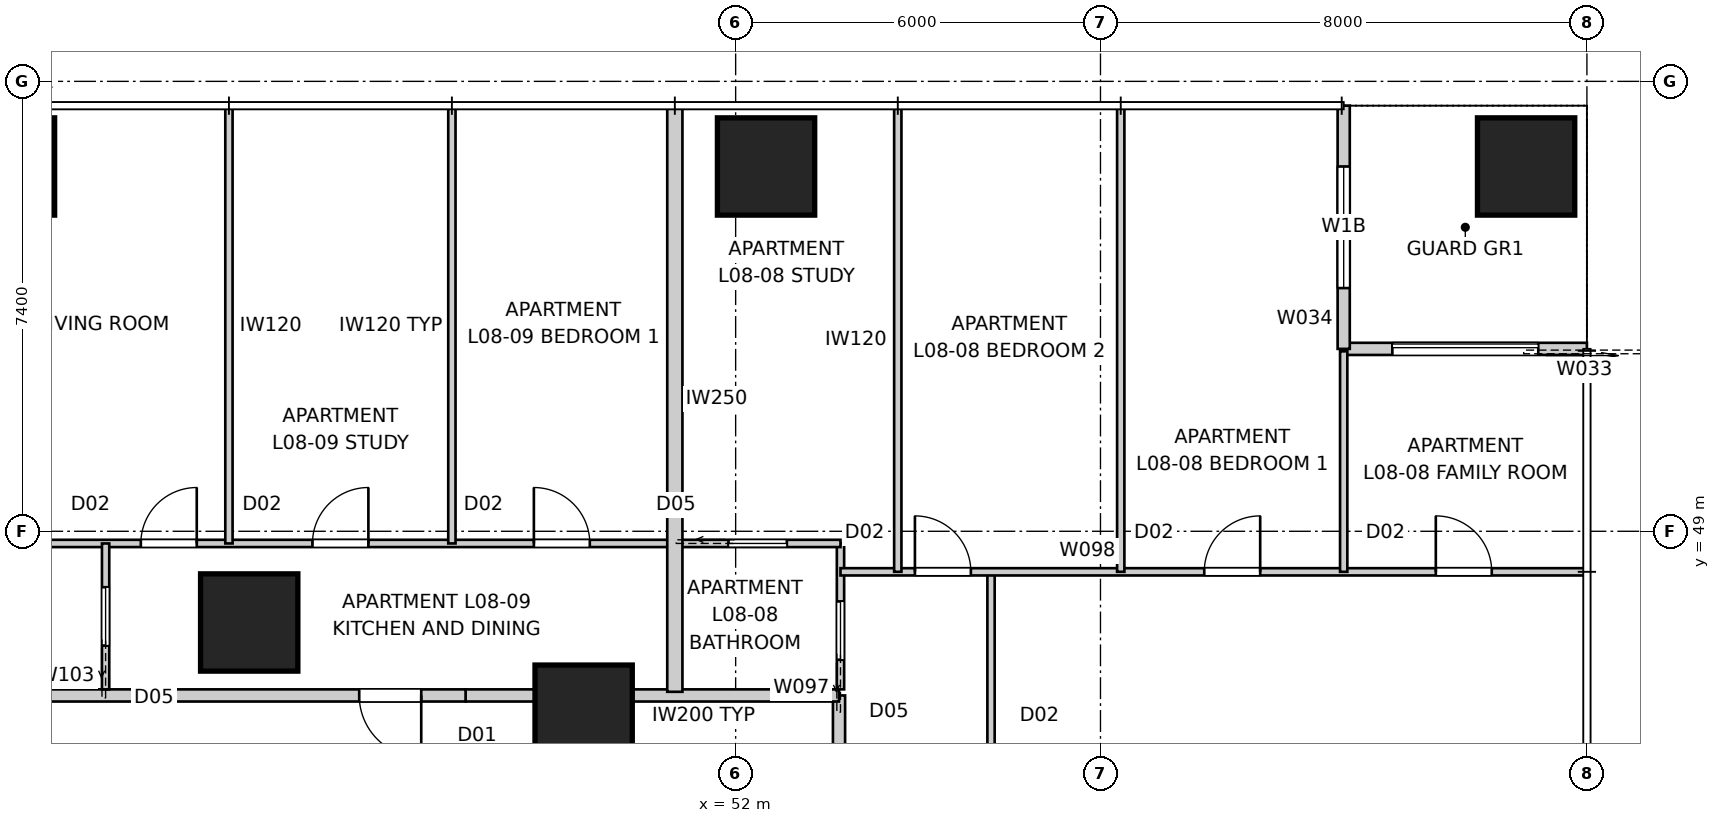
"""IFC4 building model, lengths in metres.
Left out: names, types, materials, properties, quantities, classifications, styles, units other than length and angle.
Written with IfcOpenShell. Run it as: python <this file> out.ifc"""

import sys

from ifc_helpers import new_model, si_unit, direction, frame, frame_2d, origin, origin_2d, place, context, subcontext, project, spatial, rectangle, extrude, element, fill, save


model = new_model("IFC4")
c1 = context("Model", 3, precision=1e-05, world=origin(), true_north=direction((0.0, 1.0)))
c2 = subcontext(c1, "Body", "Model", "MODEL_VIEW")
j1 = project(units=[si_unit("LENGTHUNIT", "METRE"), si_unit("PLANEANGLEUNIT", "RADIAN")], contexts=[c1])
p1 = place(None, origin())
s1 = spatial("IfcSite", under=j1, at=p1, CompositionType="ELEMENT")
p2 = place(p1, origin())
s2 = spatial("IfcBuilding", under=s1, at=p2, CompositionType="ELEMENT")
p3 = place(p2, frame((0.0, 0.0, 32.0)))
s3 = spatial("IfcBuildingStorey", under=s2, at=p3, CompositionType="ELEMENT", Elevation=32.0)
for number, where, z_axis, x_axis in (
    (1, (65.0, 55.0, 0.0), (0.0, 0.0, 1.0), (1.0, 0.0, 0.0)),
    (2, (52.5, 55.0, 0.0), (0.0, 0.0, 1.0), (1.0, 0.0, 0.0)),
    (3, (40.0, 55.0, 0.0), (0.0, 0.0, 1.0), (1.0, 0.0, 0.0)),
    (4, (49.5, 46.0, 0.0), (0.0, 0.0, 1.0), (1.0, 0.0, 0.0)),
    (5, (44.0, 47.5, 0.0), (0.0, 0.0, 1.0), (1.0, 0.0, 0.0)),
):
    element("IfcColumn", number, at=place(p3, frame(where, z_axis=z_axis, x_axis=x_axis)), inside=s3, PredefinedType="COLUMN", context=c2, shape_type="SweptSolid", body=[
        extrude(rectangle(XDim=1.6, YDim=1.6, at=origin_2d()), origin(), (0.0, 0.0, 1.0), 3.4),
    ])
p4 = place(p3, frame((66.0, 52.0, 0.0), z_axis=(0.0, 0.0, 1.0), x_axis=(-1.0, 0.0, 0.0)))
e6 = element("IfcWall", 6, at=p4, inside=s3, PredefinedType="SOLIDWALL", context=c2, shape_type="SweptSolid", body=[
    extrude(rectangle(XDim=4.0, YDim=0.2, at=frame_2d((2.0, 0.0))), origin(), (0.0, 0.0, 1.0), 3.25),
])
p5 = place(p4, frame((0.8, 0.0, 0.0)))
e7 = element("IfcOpeningElement", 7, at=p5, cuts=e6, PredefinedType="OPENING", context=c2, shape_type="SweptSolid", body=[
    extrude(rectangle(XDim=2.4, YDim=2.1, at=frame_2d((1.2, 1.05))), frame((0.0, 0.11, 0.0), z_axis=(0.0, -1.0, 0.0), x_axis=(1.0, 0.0, 0.0)), (0.0, 0.0, 1.0), 0.22),
])
p6 = place(p3, frame((62.0, 52.0, 0.0), z_axis=(0.0, 0.0, 1.0), x_axis=(0.0, 1.0, 0.0)))
e8 = element("IfcWall", 8, at=p6, inside=s3, PredefinedType="SOLIDWALL", context=c2, shape_type="SweptSolid", body=[
    extrude(rectangle(XDim=4.0, YDim=0.2, at=frame_2d((2.0, 0.0))), origin(), (0.0, 0.0, 1.0), 3.25),
])
p7 = place(p6, frame((1.0, 0.0, 0.45)))
e9 = element("IfcOpeningElement", 9, at=p7, cuts=e8, PredefinedType="OPENING", context=c2, shape_type="SweptSolid", body=[
    extrude(rectangle(XDim=2.0, YDim=1.8, at=frame_2d((1.0, 0.9))), frame((0.0, 0.11, 0.0), z_axis=(0.0, -1.0, 0.0), x_axis=(1.0, 0.0, 0.0)), (0.0, 0.0, 1.0), 0.22),
])
p8 = place(p3, frame((53.7, 13.7, 0.0), z_axis=(0.0, 0.0, 1.0), x_axis=(0.0, 1.0, 0.0)))
e10 = element("IfcWall", 10, at=p8, inside=s3, PredefinedType="PARTITIONING", context=c2, shape_type="SweptSolid", body=[
    extrude(rectangle(XDim=32.6, YDim=0.2, at=frame_2d((16.3, 0.0))), origin(), (0.0, 0.0, 1.0), 3.25),
])
p9 = place(p8, frame((2.315, 0.0, 0.0)))
e11 = element("IfcOpeningElement", 11, at=p9, cuts=e10, PredefinedType="OPENING", context=c2, shape_type="SweptSolid", body=[
    extrude(rectangle(XDim=1.02, YDim=2.34, at=frame_2d((0.51, 1.17))), frame((0.0, 0.11, 0.0), z_axis=(0.0, -1.0, 0.0), x_axis=(1.0, 0.0, 0.0)), (0.0, 0.0, 1.0), 0.22),
])
p10 = place(p8, frame((29.265, 0.0, 0.0)))
e12 = element("IfcOpeningElement", 12, at=p10, cuts=e10, PredefinedType="OPENING", context=c2, shape_type="SweptSolid", body=[
    extrude(rectangle(XDim=1.02, YDim=2.34, at=frame_2d((0.51, 1.17))), frame((0.0, 0.11, 0.0), z_axis=(0.0, -1.0, 0.0), x_axis=(1.0, 0.0, 0.0)), (0.0, 0.0, 1.0), 0.22),
])
p11 = place(p8, frame((20.646, 0.0, 0.0)))
e13 = element("IfcOpeningElement", 13, at=p11, cuts=e10, PredefinedType="OPENING", context=c2, shape_type="SweptSolid", body=[
    extrude(rectangle(XDim=1.02, YDim=2.34, at=frame_2d((0.51, 1.17))), frame((0.0, 0.11, 0.0), z_axis=(0.0, -1.0, 0.0), x_axis=(1.0, 0.0, 0.0)), (0.0, 0.0, 1.0), 0.22),
])
p12 = place(p8, frame((13.626, 0.0, 0.0)))
e14 = element("IfcOpeningElement", 14, at=p12, cuts=e10, PredefinedType="OPENING", context=c2, shape_type="SweptSolid", body=[
    extrude(rectangle(XDim=1.02, YDim=2.34, at=frame_2d((0.51, 1.17))), frame((0.0, 0.11, 0.0), z_axis=(0.0, -1.0, 0.0), x_axis=(1.0, 0.0, 0.0)), (0.0, 0.0, 1.0), 0.22),
])
p13 = place(p3, frame((53.7, 46.3, 0.0), z_axis=(0.0, 0.0, 1.0), x_axis=(-1.0, 0.0, 0.0)))
e15 = element("IfcWall", 15, at=p13, inside=s3, PredefinedType="PARTITIONING", context=c2, shape_type="SweptSolid", body=[
    extrude(rectangle(XDim=4.458, YDim=0.2, at=frame_2d((2.229, 0.0))), origin(), (0.0, 0.0, 1.0), 3.25),
])
p14 = place(p3, frame((49.242, 46.3, 0.0), z_axis=(0.0, 0.0, 1.0), x_axis=(-1.0, 0.0, 0.0)))
e16 = element("IfcWall", 16, at=p14, inside=s3, PredefinedType="PARTITIONING", context=c2, shape_type="SweptSolid", body=[
    extrude(rectangle(XDim=1.683, YDim=0.2, at=frame_2d((0.842, 0.0))), origin(), (0.0, 0.0, 1.0), 2.55),
])
p15 = place(p3, frame((47.558, 46.3, 0.0), z_axis=(0.0, 0.0, 1.0), x_axis=(-1.0, 0.0, 0.0)))
e17 = element("IfcWall", 17, at=p15, inside=s3, PredefinedType="PARTITIONING", context=c2, shape_type="SweptSolid", body=[
    extrude(rectangle(XDim=15.117, YDim=0.2, at=frame_2d((7.558, 0.0))), origin(), (0.0, 0.0, 1.0), 3.25),
])
p16 = place(p15, frame((0.729, 0.0, 0.0)))
e18 = element("IfcOpeningElement", 18, at=p16, cuts=e17, PredefinedType="OPENING", context=c2, shape_type="SweptSolid", body=[
    extrude(rectangle(XDim=1.02, YDim=2.34, at=frame_2d((0.51, 1.17))), frame((0.0, 0.11, 0.0), z_axis=(0.0, -1.0, 0.0), x_axis=(1.0, 0.0, 0.0)), (0.0, 0.0, 1.0), 0.22),
])
p17 = place(p3, frame((51.0, 56.0, 0.0), z_axis=(0.0, 0.0, 1.0), x_axis=(0.0, -1.0, 0.0)))
e19 = element("IfcWall", 19, at=p17, inside=s3, PredefinedType="PARTITIONING", context=c2, shape_type="SweptSolid", body=[
    extrude(rectangle(XDim=9.64, YDim=0.25, at=frame_2d((4.82, 0.0))), origin(), (0.0, 0.0, 1.0), 3.25),
])
p18 = place(p3, frame((56.2, 48.333, 0.0), z_axis=(0.0, 0.0, 1.0), x_axis=(0.0, -1.0, 0.0)))
e20 = element("IfcWall", 20, at=p18, inside=s3, PredefinedType="PARTITIONING", context=c2, shape_type="SweptSolid", body=[
    extrude(rectangle(XDim=36.667, YDim=0.12, at=frame_2d((18.333, 0.0))), origin(), (0.0, 0.0, 1.0), 2.55),
])
p19 = place(p18, frame((31.573, 0.0, 0.0)))
e21 = element("IfcOpeningElement", 21, at=p19, cuts=e20, PredefinedType="OPENING", context=c2, shape_type="SweptSolid", body=[
    extrude(rectangle(XDim=0.92, YDim=2.34, at=frame_2d((0.46, 1.17))), frame((0.0, 0.07, 0.0), z_axis=(0.0, -1.0, 0.0), x_axis=(1.0, 0.0, 0.0)), (0.0, 0.0, 1.0), 0.14),
])
p20 = place(p18, frame((3.207, 0.0, 0.0)))
e22 = element("IfcOpeningElement", 22, at=p20, cuts=e20, PredefinedType="OPENING", context=c2, shape_type="SweptSolid", body=[
    extrude(rectangle(XDim=0.92, YDim=2.34, at=frame_2d((0.46, 1.17))), frame((0.0, 0.07, 0.0), z_axis=(0.0, -1.0, 0.0), x_axis=(1.0, 0.0, 0.0)), (0.0, 0.0, 1.0), 0.14),
])
p21 = place(p18, frame((12.542, 0.0, 0.0)))
e23 = element("IfcOpeningElement", 23, at=p21, cuts=e20, PredefinedType="OPENING", context=c2, shape_type="SweptSolid", body=[
    extrude(rectangle(XDim=0.92, YDim=2.34, at=frame_2d((0.46, 1.17))), frame((0.0, 0.07, 0.0), z_axis=(0.0, -1.0, 0.0), x_axis=(1.0, 0.0, 0.0)), (0.0, 0.0, 1.0), 0.14),
])
p22 = place(p18, frame((19.732, 0.0, 0.0)))
e24 = element("IfcOpeningElement", 24, at=p22, cuts=e20, PredefinedType="OPENING", context=c2, shape_type="SweptSolid", body=[
    extrude(rectangle(XDim=0.92, YDim=2.34, at=frame_2d((0.46, 1.17))), frame((0.0, 0.07, 0.0), z_axis=(0.0, -1.0, 0.0), x_axis=(1.0, 0.0, 0.0)), (0.0, 0.0, 1.0), 0.14),
])
p23 = place(p18, frame((9.762, 0.0, 0.0)))
e25 = element("IfcOpeningElement", 25, at=p23, cuts=e20, PredefinedType="OPENING", context=c2, shape_type="SweptSolid", body=[
    extrude(rectangle(XDim=0.96, YDim=2.1, at=frame_2d((0.48, 1.05))), frame((0.0, 0.07, 0.0), z_axis=(0.0, -1.0, 0.0), x_axis=(1.0, 0.0, 0.0)), (0.0, 0.0, 1.0), 0.14),
])
p24 = place(p18, frame((16.52, 0.0, 0.0)))
e26 = element("IfcOpeningElement", 26, at=p24, cuts=e20, PredefinedType="OPENING", context=c2, shape_type="SweptSolid", body=[
    extrude(rectangle(XDim=0.96, YDim=2.1, at=frame_2d((0.48, 1.05))), frame((0.0, 0.07, 0.0), z_axis=(0.0, -1.0, 0.0), x_axis=(1.0, 0.0, 0.0)), (0.0, 0.0, 1.0), 0.14),
])
p25 = place(p18, frame((23.709, 0.0, 0.0)))
e27 = element("IfcOpeningElement", 27, at=p25, cuts=e20, PredefinedType="OPENING", context=c2, shape_type="SweptSolid", body=[
    extrude(rectangle(XDim=0.96, YDim=2.1, at=frame_2d((0.48, 1.05))), frame((0.0, 0.07, 0.0), z_axis=(0.0, -1.0, 0.0), x_axis=(1.0, 0.0, 0.0)), (0.0, 0.0, 1.0), 0.14),
])
p26 = place(p3, frame((53.724, 46.4, 0.0), z_axis=(0.0, 0.0, 1.0), x_axis=(0.0, 1.0, 0.0)))
e28 = element("IfcWall", 28, at=p26, inside=s3, PredefinedType="PARTITIONING", context=c2, shape_type="SweptSolid", body=[
    extrude(rectangle(XDim=2.4, YDim=0.12, at=frame_2d((1.2, 0.0))), origin(), (0.0, 0.0, 1.0), 3.25),
])
p27 = place(p26, frame((0.487, 0.0, 0.0)))
e29 = element("IfcOpeningElement", 29, at=p27, cuts=e28, PredefinedType="OPENING", context=c2, shape_type="SweptSolid", body=[
    extrude(rectangle(XDim=0.96, YDim=2.1, at=frame_2d((0.48, 1.05))), frame((0.0, 0.07, 0.0), z_axis=(0.0, -1.0, 0.0), x_axis=(1.0, 0.0, 0.0)), (0.0, 0.0, 1.0), 0.14),
])
p28 = place(p3, frame((53.724, 48.333, 0.0), z_axis=(0.0, 0.0, 1.0), x_axis=(1.0, 0.0, 0.0)))
e30 = element("IfcWall", 30, at=p28, inside=s3, PredefinedType="PARTITIONING", context=c2, shape_type="SweptSolid", body=[
    extrude(rectangle(XDim=12.236, YDim=0.12, at=frame_2d((6.118, 0.0))), origin(), (0.0, 0.0, 1.0), 3.25),
])
p29 = place(p28, frame((1.224, 0.0, 0.0)))
e31 = element("IfcOpeningElement", 31, at=p29, cuts=e30, PredefinedType="OPENING", context=c2, shape_type="SweptSolid", body=[
    extrude(rectangle(XDim=0.92, YDim=2.34, at=frame_2d((0.46, 1.17))), frame((0.0, 0.07, 0.0), z_axis=(0.0, -1.0, 0.0), x_axis=(1.0, 0.0, 0.0)), (0.0, 0.0, 1.0), 0.14),
])
p30 = place(p28, frame((9.791, 0.0, 0.0)))
e32 = element("IfcOpeningElement", 32, at=p30, cuts=e30, PredefinedType="OPENING", context=c2, shape_type="SweptSolid", body=[
    extrude(rectangle(XDim=0.92, YDim=2.34, at=frame_2d((0.46, 1.17))), frame((0.0, 0.07, 0.0), z_axis=(0.0, -1.0, 0.0), x_axis=(1.0, 0.0, 0.0)), (0.0, 0.0, 1.0), 0.14),
])
p31 = place(p28, frame((5.982, 0.0, 0.0)))
e33 = element("IfcOpeningElement", 33, at=p31, cuts=e30, PredefinedType="OPENING", context=c2, shape_type="SweptSolid", body=[
    extrude(rectangle(XDim=0.92, YDim=2.34, at=frame_2d((0.46, 1.17))), frame((0.0, 0.07, 0.0), z_axis=(0.0, -1.0, 0.0), x_axis=(1.0, 0.0, 0.0)), (0.0, 0.0, 1.0), 0.14),
])
p32 = place(p3, frame((26.315, 48.8, 0.0), z_axis=(0.0, 0.0, 1.0), x_axis=(1.0, 0.0, 0.0)))
e34 = element("IfcWall", 34, at=p32, inside=s3, PredefinedType="PARTITIONING", context=c2, shape_type="SweptSolid", body=[
    extrude(rectangle(XDim=27.41, YDim=0.12, at=frame_2d((13.705, 0.0))), origin(), (0.0, 0.0, 1.0), 3.25),
])
p33 = place(p32, frame((18.725, 0.0, 0.0)))
e35 = element("IfcOpeningElement", 35, at=p33, cuts=e34, PredefinedType="OPENING", context=c2, shape_type="SweptSolid", body=[
    extrude(rectangle(XDim=0.92, YDim=2.34, at=frame_2d((0.46, 1.17))), frame((0.0, 0.07, 0.0), z_axis=(0.0, -1.0, 0.0), x_axis=(1.0, 0.0, 0.0)), (0.0, 0.0, 1.0), 0.14),
])
p34 = place(p32, frame((22.367, 0.0, 0.0)))
e36 = element("IfcOpeningElement", 36, at=p34, cuts=e34, PredefinedType="OPENING", context=c2, shape_type="SweptSolid", body=[
    extrude(rectangle(XDim=0.92, YDim=2.34, at=frame_2d((0.46, 1.17))), frame((0.0, 0.07, 0.0), z_axis=(0.0, -1.0, 0.0), x_axis=(1.0, 0.0, 0.0)), (0.0, 0.0, 1.0), 0.14),
])
p35 = place(p32, frame((15.903, 0.0, 0.0)))
e37 = element("IfcOpeningElement", 37, at=p35, cuts=e34, PredefinedType="OPENING", context=c2, shape_type="SweptSolid", body=[
    extrude(rectangle(XDim=0.92, YDim=2.34, at=frame_2d((0.46, 1.17))), frame((0.0, 0.07, 0.0), z_axis=(0.0, -1.0, 0.0), x_axis=(1.0, 0.0, 0.0)), (0.0, 0.0, 1.0), 0.14),
])
p36 = place(p32, frame((25.567, 0.0, 0.0)))
e38 = element("IfcOpeningElement", 38, at=p36, cuts=e34, PredefinedType="OPENING", context=c2, shape_type="SweptSolid", body=[
    extrude(rectangle(XDim=0.96, YDim=2.1, at=frame_2d((0.48, 1.05))), frame((0.0, 0.07, 0.0), z_axis=(0.0, -1.0, 0.0), x_axis=(1.0, 0.0, 0.0)), (0.0, 0.0, 1.0), 0.14),
])
p37 = place(p32, frame((0.863, 0.0, 0.0)))
e39 = element("IfcOpeningElement", 39, at=p37, cuts=e34, PredefinedType="OPENING", context=c2, shape_type="SweptSolid", body=[
    extrude(rectangle(XDim=0.96, YDim=2.1, at=frame_2d((0.48, 1.05))), frame((0.0, 0.07, 0.0), z_axis=(0.0, -1.0, 0.0), x_axis=(1.0, 0.0, 0.0)), (0.0, 0.0, 1.0), 0.14),
])
p38 = place(p32, frame((7.503, 0.0, 0.0)))
e40 = element("IfcOpeningElement", 40, at=p38, cuts=e34, PredefinedType="OPENING", context=c2, shape_type="SweptSolid", body=[
    extrude(rectangle(XDim=0.96, YDim=2.1, at=frame_2d((0.48, 1.05))), frame((0.0, 0.07, 0.0), z_axis=(0.0, -1.0, 0.0), x_axis=(1.0, 0.0, 0.0)), (0.0, 0.0, 1.0), 0.14),
])
p39 = place(p3, frame((58.333, 48.333, 0.0), z_axis=(0.0, 0.0, 1.0), x_axis=(0.0, 1.0, 0.0)))
e41 = element("IfcWall", 41, at=p39, inside=s3, PredefinedType="PARTITIONING", context=c2, shape_type="SweptSolid", body=[
    extrude(rectangle(XDim=7.627, YDim=0.12, at=frame_2d((3.813, 0.0))), origin(), (0.0, 0.0, 1.0), 3.25),
])
p40 = place(p3, frame((62.0, 51.96, 0.0), z_axis=(0.0, 0.0, 1.0), x_axis=(0.0, -1.0, 0.0)))
e42 = element("IfcWall", 42, at=p40, inside=s3, PredefinedType="PARTITIONING", context=c2, shape_type="SweptSolid", body=[
    extrude(rectangle(XDim=3.627, YDim=0.12, at=frame_2d((1.813, 0.0))), origin(), (0.0, 0.0, 1.0), 3.25),
])
p41 = place(p3, frame((54.667, 48.333, 0.0), z_axis=(0.0, 0.0, 1.0), x_axis=(0.0, 1.0, 0.0)))
e43 = element("IfcWall", 43, at=p41, inside=s3, PredefinedType="PARTITIONING", context=c2, shape_type="SweptSolid", body=[
    extrude(rectangle(XDim=7.627, YDim=0.12, at=frame_2d((3.813, 0.0))), origin(), (0.0, 0.0, 1.0), 2.638),
])
p42 = place(p3, frame((41.638, 46.4, 0.0), z_axis=(0.0, 0.0, 1.0), x_axis=(0.0, 1.0, 0.0)))
e44 = element("IfcWall", 44, at=p42, inside=s3, PredefinedType="PARTITIONING", context=c2, shape_type="SweptSolid", body=[
    extrude(rectangle(XDim=2.4, YDim=0.12, at=frame_2d((1.2, 0.0))), origin(), (0.0, 0.0, 1.0), 3.25),
])
p43 = place(p42, frame((0.72, 0.0, 0.0)))
e45 = element("IfcOpeningElement", 45, at=p43, cuts=e44, PredefinedType="OPENING", context=c2, shape_type="SweptSolid", body=[
    extrude(rectangle(XDim=0.96, YDim=2.1, at=frame_2d((0.48, 1.05))), frame((0.0, 0.07, 0.0), z_axis=(0.0, -1.0, 0.0), x_axis=(1.0, 0.0, 0.0)), (0.0, 0.0, 1.0), 0.14),
])
for number, where, z_axis, x_axis in (
    (46, (43.667, 55.96, 0.0), (0.0, 0.0, 1.0), (0.0, -1.0, 0.0)),
    (47, (47.333, 48.8, 0.0), (0.0, 0.0, 1.0), (0.0, 1.0, 0.0)),
):
    element("IfcWall", number, at=place(p3, frame(where, z_axis=z_axis, x_axis=x_axis)), inside=s3, PredefinedType="PARTITIONING", context=c2, shape_type="SweptSolid", body=[
        extrude(rectangle(XDim=7.16, YDim=0.12, at=frame_2d((3.58, 0.0))), origin(), (0.0, 0.0, 1.0), 3.25),
    ])
p44 = place(p5, origin())
e48 = element("IfcDoor", 48, at=p44, inside=s3, OperationType="SLIDING_TO_LEFT", PredefinedType="DOOR", context=c2, shape_type="SweptSolid", body=[
    extrude(rectangle(XDim=2.4, YDim=2.1, at=frame_2d((1.2, 1.05))), frame((0.0, 0.025, 0.0), z_axis=(0.0, -1.0, 0.0), x_axis=(1.0, 0.0, 0.0)), (0.0, 0.0, 1.0), 0.05),
])
fill(e7, e48)
p45 = place(p7, origin())
e49 = element("IfcWindow", 49, at=p45, inside=s3, PartitioningType="SINGLE_PANEL", PredefinedType="WINDOW", context=c2, shape_type="SweptSolid", body=[
    extrude(rectangle(XDim=2.0, YDim=1.8, at=frame_2d((1.0, 0.9))), frame((0.0, 0.03, 0.0), z_axis=(0.0, -1.0, 0.0), x_axis=(1.0, 0.0, 0.0)), (0.0, 0.0, 1.0), 0.06),
])
fill(e9, e49)
p46 = place(p16, origin())
e50 = element("IfcDoor", 50, at=p46, inside=s3, OperationType="SINGLE_SWING_LEFT", PredefinedType="DOOR", context=c2, shape_type="SweptSolid", body=[
    extrude(rectangle(XDim=1.02, YDim=2.34, at=frame_2d((0.51, 1.17))), frame((0.0, 0.025, 0.0), z_axis=(0.0, -1.0, 0.0), x_axis=(1.0, 0.0, 0.0)), (0.0, 0.0, 1.0), 0.05),
])
fill(e18, e50)
p47 = place(p33, origin())
e51 = element("IfcDoor", 51, at=p47, inside=s3, OperationType="SINGLE_SWING_RIGHT", PredefinedType="DOOR", context=c2, shape_type="SweptSolid", body=[
    extrude(rectangle(XDim=0.92, YDim=2.34, at=frame_2d((0.46, 1.17))), frame((0.0, 0.025, 0.0), z_axis=(0.0, -1.0, 0.0), x_axis=(1.0, 0.0, 0.0)), (0.0, 0.0, 1.0), 0.05),
])
fill(e35, e51)
p48 = place(p34, origin())
e52 = element("IfcDoor", 52, at=p48, inside=s3, OperationType="SINGLE_SWING_LEFT", PredefinedType="DOOR", context=c2, shape_type="SweptSolid", body=[
    extrude(rectangle(XDim=0.92, YDim=2.34, at=frame_2d((0.46, 1.17))), frame((0.0, 0.025, 0.0), z_axis=(0.0, -1.0, 0.0), x_axis=(1.0, 0.0, 0.0)), (0.0, 0.0, 1.0), 0.05),
])
fill(e36, e52)
p49 = place(p43, origin())
e53 = element("IfcDoor", 53, at=p49, inside=s3, OperationType="SLIDING_TO_LEFT", PredefinedType="DOOR", context=c2, shape_type="SweptSolid", body=[
    extrude(rectangle(XDim=0.96, YDim=2.1, at=frame_2d((0.48, 1.05))), frame((0.0, 0.025, 0.0), z_axis=(0.0, -1.0, 0.0), x_axis=(1.0, 0.0, 0.0)), (0.0, 0.0, 1.0), 0.05),
])
fill(e45, e53)
p50 = place(p35, origin())
e54 = element("IfcDoor", 54, at=p50, inside=s3, OperationType="SINGLE_SWING_RIGHT", PredefinedType="DOOR", context=c2, shape_type="SweptSolid", body=[
    extrude(rectangle(XDim=0.92, YDim=2.34, at=frame_2d((0.46, 1.17))), frame((0.0, 0.025, 0.0), z_axis=(0.0, -1.0, 0.0), x_axis=(1.0, 0.0, 0.0)), (0.0, 0.0, 1.0), 0.05),
])
fill(e37, e54)
p51 = place(p27, origin())
e55 = element("IfcDoor", 55, at=p51, inside=s3, OperationType="SLIDING_TO_LEFT", PredefinedType="DOOR", context=c2, shape_type="SweptSolid", body=[
    extrude(rectangle(XDim=0.96, YDim=2.1, at=frame_2d((0.48, 1.05))), frame((0.0, 0.025, 0.0), z_axis=(0.0, -1.0, 0.0), x_axis=(1.0, 0.0, 0.0)), (0.0, 0.0, 1.0), 0.05),
])
fill(e29, e55)
p52 = place(p29, origin())
e56 = element("IfcDoor", 56, at=p52, inside=s3, OperationType="SINGLE_SWING_LEFT", PredefinedType="DOOR", context=c2, shape_type="SweptSolid", body=[
    extrude(rectangle(XDim=0.92, YDim=2.34, at=frame_2d((0.46, 1.17))), frame((0.0, 0.025, 0.0), z_axis=(0.0, -1.0, 0.0), x_axis=(1.0, 0.0, 0.0)), (0.0, 0.0, 1.0), 0.05),
])
fill(e31, e56)
p53 = place(p30, origin())
e57 = element("IfcDoor", 57, at=p53, inside=s3, OperationType="SINGLE_SWING_LEFT", PredefinedType="DOOR", context=c2, shape_type="SweptSolid", body=[
    extrude(rectangle(XDim=0.92, YDim=2.34, at=frame_2d((0.46, 1.17))), frame((0.0, 0.025, 0.0), z_axis=(0.0, -1.0, 0.0), x_axis=(1.0, 0.0, 0.0)), (0.0, 0.0, 1.0), 0.05),
])
fill(e32, e57)
p54 = place(p31, origin())
e58 = element("IfcDoor", 58, at=p54, inside=s3, OperationType="SINGLE_SWING_RIGHT", PredefinedType="DOOR", context=c2, shape_type="SweptSolid", body=[
    extrude(rectangle(XDim=0.92, YDim=2.34, at=frame_2d((0.46, 1.17))), frame((0.0, 0.025, 0.0), z_axis=(0.0, -1.0, 0.0), x_axis=(1.0, 0.0, 0.0)), (0.0, 0.0, 1.0), 0.05),
])
fill(e33, e58)
p55 = place(p36, origin())
e59 = element("IfcDoor", 59, at=p55, inside=s3, OperationType="SLIDING_TO_LEFT", PredefinedType="DOOR", context=c2, shape_type="SweptSolid", body=[
    extrude(rectangle(XDim=0.96, YDim=2.1, at=frame_2d((0.48, 1.05))), frame((0.0, 0.025, 0.0), z_axis=(0.0, -1.0, 0.0), x_axis=(1.0, 0.0, 0.0)), (0.0, 0.0, 1.0), 0.05),
])
fill(e38, e59)
save(model, sys.argv[1])
